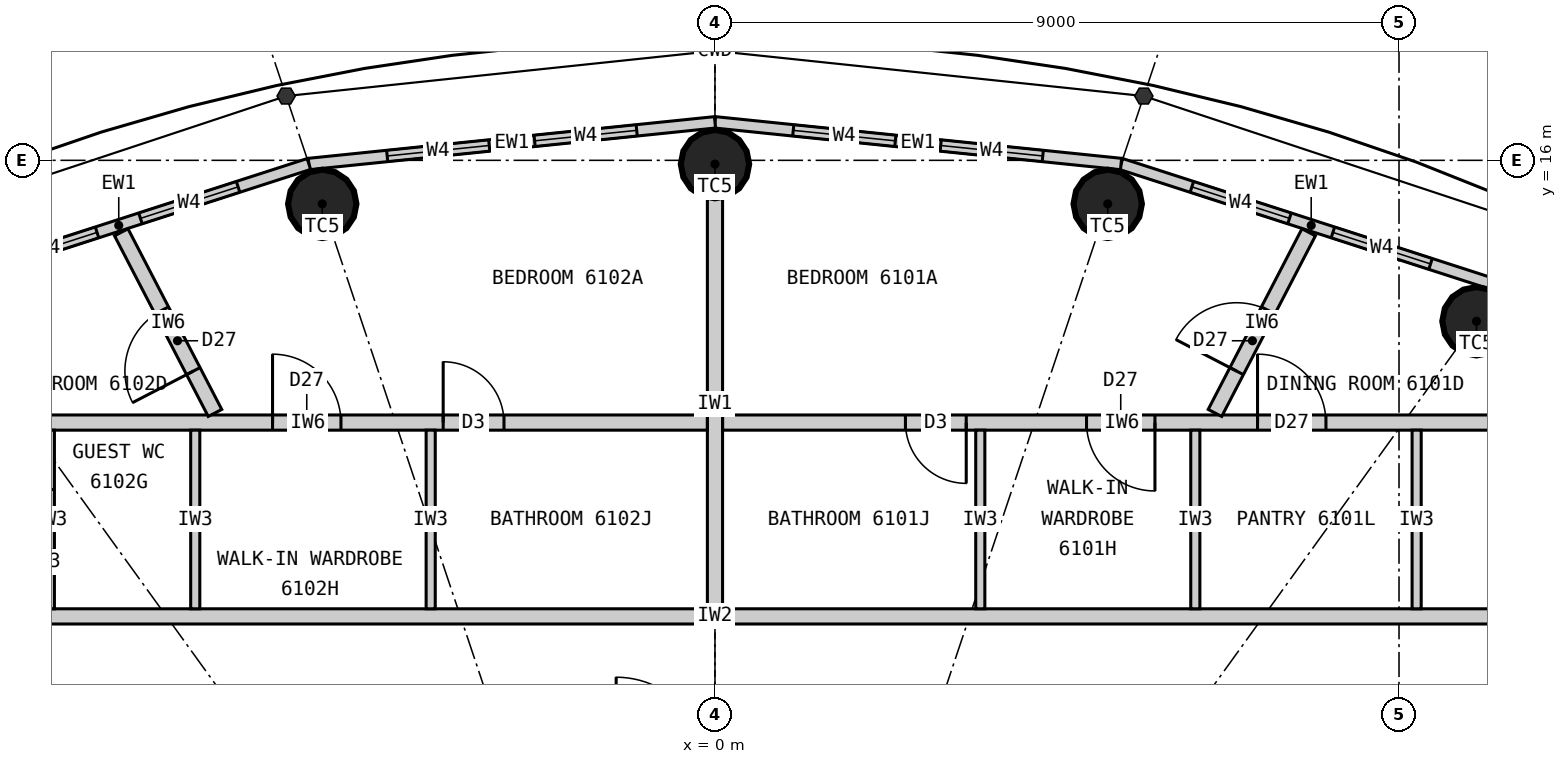
"""IFC4 building model, lengths in metres.
Left out: names, types, materials, properties, quantities, classifications, styles, units other than length and angle.
Written with IfcOpenShell. Run it as: python <this file> out.ifc"""

import sys

from ifc_helpers import new_model, si_unit, direction, frame, frame_2d, origin, origin_2d, place, context, subcontext, project, spatial, rectangle, circle, extrude, element, fill, save


model = new_model("IFC4")
c1 = context("Model", 3, precision=1e-05, world=origin(), true_north=direction((0.0, 1.0)))
c2 = subcontext(c1, "Body", "Model", "MODEL_VIEW")
j1 = project(units=[si_unit("LENGTHUNIT", "METRE"), si_unit("PLANEANGLEUNIT", "RADIAN")], contexts=[c1])
p1 = place(None, origin())
s1 = spatial("IfcSite", under=j1, at=p1, CompositionType="ELEMENT")
p2 = place(p1, origin())
s2 = spatial("IfcBuilding", under=s1, at=p2, CompositionType="ELEMENT")
p3 = place(p2, frame((0.0, 0.0, 225.9)))
s3 = spatial("IfcBuildingStorey", under=s2, at=p3, CompositionType="ELEMENT", Elevation=225.9)
for number, where, z_axis, x_axis in (
    (1, (10.019, 13.883, 0.0), (0.0, 0.0, 1.0), (1.0, 0.0, 0.0)),
    (2, (5.167, 15.427, 0.0), (0.0, 0.0, 1.0), (1.0, 0.0, 0.0)),
    (3, (0.0, 15.95, 0.0), (0.0, 0.0, 1.0), (1.0, 0.0, 0.0)),
    (4, (-5.167, 15.427, 0.0), (0.0, 0.0, 1.0), (1.0, 0.0, 0.0)),
):
    element("IfcColumn", number, at=place(p3, frame(where, z_axis=z_axis, x_axis=x_axis)), inside=s3, PredefinedType="COLUMN", context=c2, shape_type="SweptSolid", body=[
        extrude(circle(Radius=0.45, at=origin_2d()), origin(), (0.0, 0.0, 1.0), 3.3),
    ])
p4 = place(p3, frame((10.346, 14.336, 0.0), z_axis=(0.0, 0.0, 1.0), x_axis=(-0.951644702515, 0.307200846638, 0.0)))
e5 = element("IfcWall", 5, at=p4, inside=s3, PredefinedType="ELEMENTEDWALL", context=c2, shape_type="SweptSolid", body=[
    extrude(rectangle(XDim=5.258, YDim=0.15, at=frame_2d((2.629, 0.0))), origin(), (0.0, 0.0, 1.0), 3.12),
])
p5 = place(p4, frame((0.979, 0.0, 0.9)))
e6 = element("IfcOpeningElement", 6, at=p5, cuts=e5, PredefinedType="OPENING", context=c2, shape_type="SweptSolid", body=[
    extrude(rectangle(XDim=1.35, YDim=1.9, at=frame_2d((0.675, 0.95))), frame((0.0, 0.085, 0.0), z_axis=(0.0, -1.0, 0.0), x_axis=(1.0, 0.0, 0.0)), (0.0, 0.0, 1.0), 0.17),
])
p6 = place(p4, frame((2.929, 0.0, 0.9)))
e7 = element("IfcOpeningElement", 7, at=p6, cuts=e5, PredefinedType="OPENING", context=c2, shape_type="SweptSolid", body=[
    extrude(rectangle(XDim=1.35, YDim=1.9, at=frame_2d((0.675, 0.95))), frame((0.0, 0.085, 0.0), z_axis=(0.0, -1.0, 0.0), x_axis=(1.0, 0.0, 0.0)), (0.0, 0.0, 1.0), 0.17),
])
p7 = place(p3, frame((5.343, 15.952, 0.0), z_axis=(0.0, 0.0, 1.0), x_axis=(-0.994774574972, 0.102095763818, 0.0)))
e8 = element("IfcWall", 8, at=p7, inside=s3, PredefinedType="ELEMENTEDWALL", context=c2, shape_type="SweptSolid", body=[
    extrude(rectangle(XDim=5.371, YDim=0.15, at=frame_2d((2.686, 0.0))), origin(), (0.0, 0.0, 1.0), 3.12),
])
p8 = place(p7, frame((1.035, 0.0, 0.9)))
e9 = element("IfcOpeningElement", 9, at=p8, cuts=e8, PredefinedType="OPENING", context=c2, shape_type="SweptSolid", body=[
    extrude(rectangle(XDim=1.35, YDim=1.9, at=frame_2d((0.675, 0.95))), frame((0.0, 0.085, 0.0), z_axis=(0.0, -1.0, 0.0), x_axis=(1.0, 0.0, 0.0)), (0.0, 0.0, 1.0), 0.17),
])
p9 = place(p7, frame((2.985, 0.0, 0.9)))
e10 = element("IfcOpeningElement", 10, at=p9, cuts=e8, PredefinedType="OPENING", context=c2, shape_type="SweptSolid", body=[
    extrude(rectangle(XDim=1.35, YDim=1.9, at=frame_2d((0.675, 0.95))), frame((0.0, 0.085, 0.0), z_axis=(0.0, -1.0, 0.0), x_axis=(1.0, 0.0, 0.0)), (0.0, 0.0, 1.0), 0.17),
])
p10 = place(p3, frame((0.0, 16.5, 0.0), z_axis=(0.0, 0.0, 1.0), x_axis=(-0.994774574972, -0.102095763818, 0.0)))
e11 = element("IfcWall", 11, at=p10, inside=s3, PredefinedType="ELEMENTEDWALL", context=c2, shape_type="SweptSolid", body=[
    extrude(rectangle(XDim=5.371, YDim=0.15, at=frame_2d((2.686, 0.0))), origin(), (0.0, 0.0, 1.0), 3.12),
])
p11 = place(p10, frame((1.035, 0.0, 0.9)))
e12 = element("IfcOpeningElement", 12, at=p11, cuts=e11, PredefinedType="OPENING", context=c2, shape_type="SweptSolid", body=[
    extrude(rectangle(XDim=1.35, YDim=1.9, at=frame_2d((0.675, 0.95))), frame((0.0, 0.085, 0.0), z_axis=(0.0, -1.0, 0.0), x_axis=(1.0, 0.0, 0.0)), (0.0, 0.0, 1.0), 0.17),
])
p12 = place(p10, frame((2.985, 0.0, 0.9)))
e13 = element("IfcOpeningElement", 13, at=p12, cuts=e11, PredefinedType="OPENING", context=c2, shape_type="SweptSolid", body=[
    extrude(rectangle(XDim=1.35, YDim=1.9, at=frame_2d((0.675, 0.95))), frame((0.0, 0.085, 0.0), z_axis=(0.0, -1.0, 0.0), x_axis=(1.0, 0.0, 0.0)), (0.0, 0.0, 1.0), 0.17),
])
p13 = place(p3, frame((-5.343, 15.952, 0.0), z_axis=(0.0, 0.0, 1.0), x_axis=(-0.951644702515, -0.307200846638, 0.0)))
e14 = element("IfcWall", 14, at=p13, inside=s3, PredefinedType="ELEMENTEDWALL", context=c2, shape_type="SweptSolid", body=[
    extrude(rectangle(XDim=5.258, YDim=0.15, at=frame_2d((2.629, 0.0))), origin(), (0.0, 0.0, 1.0), 3.12),
])
p14 = place(p13, frame((0.979, 0.0, 0.9)))
e15 = element("IfcOpeningElement", 15, at=p14, cuts=e14, PredefinedType="OPENING", context=c2, shape_type="SweptSolid", body=[
    extrude(rectangle(XDim=1.35, YDim=1.9, at=frame_2d((0.675, 0.95))), frame((0.0, 0.085, 0.0), z_axis=(0.0, -1.0, 0.0), x_axis=(1.0, 0.0, 0.0)), (0.0, 0.0, 1.0), 0.17),
])
p15 = place(p13, frame((2.929, 0.0, 0.9)))
e16 = element("IfcOpeningElement", 16, at=p15, cuts=e14, PredefinedType="OPENING", context=c2, shape_type="SweptSolid", body=[
    extrude(rectangle(XDim=1.35, YDim=1.9, at=frame_2d((0.675, 0.95))), frame((0.0, 0.085, 0.0), z_axis=(0.0, -1.0, 0.0), x_axis=(1.0, 0.0, 0.0)), (0.0, 0.0, 1.0), 0.17),
])
p16 = place(p3, frame((-11.1, 10.0, 0.0), z_axis=(0.0, 0.0, 1.0), x_axis=(1.0, 0.0, 0.0)))
e17 = element("IfcWall", 17, at=p16, inside=s3, PredefinedType="PARTITIONING", context=c2, shape_type="SweptSolid", body=[
    extrude(rectangle(XDim=22.2, YDim=0.2, at=frame_2d((11.1, 0.0))), origin(), (0.0, 0.0, 1.0), 3.12),
])
p17 = place(p16, frame((0.3, 0.0, 0.0)))
e18 = element("IfcOpeningElement", 18, at=p17, cuts=e17, PredefinedType="OPENING", context=c2, shape_type="SweptSolid", body=[
    extrude(rectangle(XDim=1.0, YDim=2.2, at=frame_2d((0.5, 1.1))), frame((0.0, 0.11, 0.0), z_axis=(0.0, -1.0, 0.0), x_axis=(1.0, 0.0, 0.0)), (0.0, 0.0, 1.0), 0.22),
])
p18 = place(p3, frame((0.0, 10.1, 0.0), z_axis=(0.0, 0.0, 1.0), x_axis=(0.0, 1.0, 0.0)))
e19 = element("IfcWall", 19, at=p18, inside=s3, PredefinedType="PARTITIONING", context=c2, shape_type="SweptSolid", body=[
    extrude(rectangle(XDim=5.4, YDim=0.2, at=frame_2d((2.7, 0.0))), origin(), (0.0, 0.0, 1.0), 2.42),
])
p19 = place(p3, frame((10.609, 12.55, 0.0), z_axis=(0.0, 0.0, 1.0), x_axis=(-1.0, 0.0, 0.0)))
e20 = element("IfcWall", 20, at=p19, inside=s3, PredefinedType="PARTITIONING", context=c2, shape_type="SweptSolid", body=[
    extrude(rectangle(XDim=10.508, YDim=0.2, at=frame_2d((5.254, 0.0))), origin(), (0.0, 0.0, 1.0), 3.12),
])
p20 = place(p19, frame((2.57, 0.0, 0.0)))
e21 = element("IfcOpeningElement", 21, at=p20, cuts=e20, PredefinedType="OPENING", context=c2, shape_type="SweptSolid", body=[
    extrude(rectangle(XDim=0.9, YDim=2.1, at=frame_2d((0.45, 1.05))), frame((0.0, 0.11, 0.0), z_axis=(0.0, -1.0, 0.0), x_axis=(1.0, 0.0, 0.0)), (0.0, 0.0, 1.0), 0.22),
])
p21 = place(p19, frame((4.82, 0.0, 0.0)))
e22 = element("IfcOpeningElement", 22, at=p21, cuts=e20, PredefinedType="OPENING", context=c2, shape_type="SweptSolid", body=[
    extrude(rectangle(XDim=0.9, YDim=2.1, at=frame_2d((0.45, 1.05))), frame((0.0, 0.11, 0.0), z_axis=(0.0, -1.0, 0.0), x_axis=(1.0, 0.0, 0.0)), (0.0, 0.0, 1.0), 0.22),
])
p22 = place(p19, frame((7.303, 0.0, 0.0)))
e23 = element("IfcOpeningElement", 23, at=p22, cuts=e20, PredefinedType="OPENING", context=c2, shape_type="SweptSolid", body=[
    extrude(rectangle(XDim=0.8, YDim=2.1, at=frame_2d((0.4, 1.05))), frame((0.0, 0.11, 0.0), z_axis=(0.0, -1.0, 0.0), x_axis=(1.0, 0.0, 0.0)), (0.0, 0.0, 1.0), 0.22),
])
p23 = place(p3, frame((6.578, 12.677, 0.0), z_axis=(0.0, 0.0, 1.0), x_axis=(0.460620531465, 0.887597164255, 0.0)))
e24 = element("IfcWall", 24, at=p23, inside=s3, PredefinedType="PARTITIONING", context=c2, shape_type="SweptSolid", body=[
    extrude(rectangle(XDim=2.678, YDim=0.2, at=frame_2d((1.339, 0.0))), origin(), (0.0, 0.0, 1.0), 3.12),
])
p24 = place(p23, frame((0.62, 0.0, 0.0)))
e25 = element("IfcOpeningElement", 25, at=p24, cuts=e24, PredefinedType="OPENING", context=c2, shape_type="SweptSolid", body=[
    extrude(rectangle(XDim=0.9, YDim=2.1, at=frame_2d((0.45, 1.05))), frame((0.0, 0.11, 0.0), z_axis=(0.0, -1.0, 0.0), x_axis=(1.0, 0.0, 0.0)), (0.0, 0.0, 1.0), 0.22),
])
for number, where, z_axis, x_axis in (
    (26, (9.232, 10.1, 0.0), (0.0, 0.0, 1.0), (0.0, 1.0, 0.0)),
    (27, (6.32, 10.1, 0.0), (0.0, 0.0, 1.0), (0.0, 1.0, 0.0)),
    (28, (3.491, 10.1, 0.0), (0.0, 0.0, 1.0), (0.0, 1.0, 0.0)),
):
    element("IfcWall", number, at=place(p3, frame(where, z_axis=z_axis, x_axis=x_axis)), inside=s3, PredefinedType="PARTITIONING", context=c2, shape_type="SweptSolid", body=[
        extrude(rectangle(XDim=2.35, YDim=0.12, at=frame_2d((1.175, 0.0))), origin(), (0.0, 0.0, 1.0), 3.12),
    ])
p25 = place(p3, frame((-0.101, 12.55, 0.0), z_axis=(0.0, 0.0, 1.0), x_axis=(-1.0, 0.0, 0.0)))
e29 = element("IfcWall", 29, at=p25, inside=s3, PredefinedType="PARTITIONING", context=c2, shape_type="SweptSolid", body=[
    extrude(rectangle(XDim=10.508, YDim=0.2, at=frame_2d((5.254, 0.0))), origin(), (0.0, 0.0, 1.0), 3.12),
])
p26 = place(p25, frame((2.675, 0.0, 0.0)))
e30 = element("IfcOpeningElement", 30, at=p26, cuts=e29, PredefinedType="OPENING", context=c2, shape_type="SweptSolid", body=[
    extrude(rectangle(XDim=0.8, YDim=2.1, at=frame_2d((0.4, 1.05))), frame((0.0, 0.11, 0.0), z_axis=(0.0, -1.0, 0.0), x_axis=(1.0, 0.0, 0.0)), (0.0, 0.0, 1.0), 0.22),
])
p27 = place(p25, frame((4.82, 0.0, 0.0)))
e31 = element("IfcOpeningElement", 31, at=p27, cuts=e29, PredefinedType="OPENING", context=c2, shape_type="SweptSolid", body=[
    extrude(rectangle(XDim=0.9, YDim=2.1, at=frame_2d((0.45, 1.05))), frame((0.0, 0.11, 0.0), z_axis=(0.0, -1.0, 0.0), x_axis=(1.0, 0.0, 0.0)), (0.0, 0.0, 1.0), 0.22),
])
p28 = place(p3, frame((-6.578, 12.677, 0.0), z_axis=(0.0, 0.0, 1.0), x_axis=(-0.460620531465, 0.887597164255, 0.0)))
e32 = element("IfcWall", 32, at=p28, inside=s3, PredefinedType="PARTITIONING", context=c2, shape_type="SweptSolid", body=[
    extrude(rectangle(XDim=2.678, YDim=0.2, at=frame_2d((1.339, 0.0))), origin(), (0.0, 0.0, 1.0), 3.12),
])
p29 = place(p28, frame((0.62, 0.0, 0.0)))
e33 = element("IfcOpeningElement", 33, at=p29, cuts=e32, PredefinedType="OPENING", context=c2, shape_type="SweptSolid", body=[
    extrude(rectangle(XDim=0.9, YDim=2.1, at=frame_2d((0.45, 1.05))), frame((0.0, 0.11, 0.0), z_axis=(0.0, -1.0, 0.0), x_axis=(1.0, 0.0, 0.0)), (0.0, 0.0, 1.0), 0.22),
])
for number, where, z_axis, x_axis in (
    (34, (-3.74, 10.1, 0.0), (0.0, 0.0, 1.0), (0.0, 1.0, 0.0)),
    (35, (-6.838, 10.1, 0.0), (0.0, 0.0, 1.0), (0.0, 1.0, 0.0)),
):
    element("IfcWall", number, at=place(p3, frame(where, z_axis=z_axis, x_axis=x_axis)), inside=s3, PredefinedType="PARTITIONING", context=c2, shape_type="SweptSolid", body=[
        extrude(rectangle(XDim=2.35, YDim=0.12, at=frame_2d((1.175, 0.0))), origin(), (0.0, 0.0, 1.0), 3.12),
    ])
p30 = place(p3, frame((-8.751, 10.1, 0.0), z_axis=(0.0, 0.0, 1.0), x_axis=(0.0, 1.0, 0.0)))
e36 = element("IfcWall", 36, at=p30, inside=s3, PredefinedType="PARTITIONING", context=c2, shape_type="SweptSolid", body=[
    extrude(rectangle(XDim=2.35, YDim=0.12, at=frame_2d((1.175, 0.0))), origin(), (0.0, 0.0, 1.0), 3.12),
])
p31 = place(p30, frame((0.77, 0.0, 0.0)))
e37 = element("IfcOpeningElement", 37, at=p31, cuts=e36, PredefinedType="OPENING", context=c2, shape_type="SweptSolid", body=[
    extrude(rectangle(XDim=0.8, YDim=2.1, at=frame_2d((0.4, 1.05))), frame((0.0, 0.07, 0.0), z_axis=(0.0, -1.0, 0.0), x_axis=(1.0, 0.0, 0.0)), (0.0, 0.0, 1.0), 0.14),
])
p32 = place(p5, origin())
e38 = element("IfcWindow", 38, at=p32, inside=s3, PartitioningType="SINGLE_PANEL", PredefinedType="WINDOW", context=c2, shape_type="SweptSolid", body=[
    extrude(rectangle(XDim=1.35, YDim=1.9, at=frame_2d((0.675, 0.95))), frame((0.0, 0.03, 0.0), z_axis=(0.0, -1.0, 0.0), x_axis=(1.0, 0.0, 0.0)), (0.0, 0.0, 1.0), 0.06),
])
fill(e6, e38)
p33 = place(p6, origin())
e39 = element("IfcWindow", 39, at=p33, inside=s3, PartitioningType="SINGLE_PANEL", PredefinedType="WINDOW", context=c2, shape_type="SweptSolid", body=[
    extrude(rectangle(XDim=1.35, YDim=1.9, at=frame_2d((0.675, 0.95))), frame((0.0, 0.03, 0.0), z_axis=(0.0, -1.0, 0.0), x_axis=(1.0, 0.0, 0.0)), (0.0, 0.0, 1.0), 0.06),
])
fill(e7, e39)
p34 = place(p8, origin())
e40 = element("IfcWindow", 40, at=p34, inside=s3, PartitioningType="SINGLE_PANEL", PredefinedType="WINDOW", context=c2, shape_type="SweptSolid", body=[
    extrude(rectangle(XDim=1.35, YDim=1.9, at=frame_2d((0.675, 0.95))), frame((0.0, 0.03, 0.0), z_axis=(0.0, -1.0, 0.0), x_axis=(1.0, 0.0, 0.0)), (0.0, 0.0, 1.0), 0.06),
])
fill(e9, e40)
p35 = place(p9, origin())
e41 = element("IfcWindow", 41, at=p35, inside=s3, PartitioningType="SINGLE_PANEL", PredefinedType="WINDOW", context=c2, shape_type="SweptSolid", body=[
    extrude(rectangle(XDim=1.35, YDim=1.9, at=frame_2d((0.675, 0.95))), frame((0.0, 0.03, 0.0), z_axis=(0.0, -1.0, 0.0), x_axis=(1.0, 0.0, 0.0)), (0.0, 0.0, 1.0), 0.06),
])
fill(e10, e41)
p36 = place(p11, origin())
e42 = element("IfcWindow", 42, at=p36, inside=s3, PartitioningType="SINGLE_PANEL", PredefinedType="WINDOW", context=c2, shape_type="SweptSolid", body=[
    extrude(rectangle(XDim=1.35, YDim=1.9, at=frame_2d((0.675, 0.95))), frame((0.0, 0.03, 0.0), z_axis=(0.0, -1.0, 0.0), x_axis=(1.0, 0.0, 0.0)), (0.0, 0.0, 1.0), 0.06),
])
fill(e12, e42)
p37 = place(p12, origin())
e43 = element("IfcWindow", 43, at=p37, inside=s3, PartitioningType="SINGLE_PANEL", PredefinedType="WINDOW", context=c2, shape_type="SweptSolid", body=[
    extrude(rectangle(XDim=1.35, YDim=1.9, at=frame_2d((0.675, 0.95))), frame((0.0, 0.03, 0.0), z_axis=(0.0, -1.0, 0.0), x_axis=(1.0, 0.0, 0.0)), (0.0, 0.0, 1.0), 0.06),
])
fill(e13, e43)
p38 = place(p14, origin())
e44 = element("IfcWindow", 44, at=p38, inside=s3, PartitioningType="SINGLE_PANEL", PredefinedType="WINDOW", context=c2, shape_type="SweptSolid", body=[
    extrude(rectangle(XDim=1.35, YDim=1.9, at=frame_2d((0.675, 0.95))), frame((0.0, 0.03, 0.0), z_axis=(0.0, -1.0, 0.0), x_axis=(1.0, 0.0, 0.0)), (0.0, 0.0, 1.0), 0.06),
])
fill(e15, e44)
p39 = place(p15, origin())
e45 = element("IfcWindow", 45, at=p39, inside=s3, PartitioningType="SINGLE_PANEL", PredefinedType="WINDOW", context=c2, shape_type="SweptSolid", body=[
    extrude(rectangle(XDim=1.35, YDim=1.9, at=frame_2d((0.675, 0.95))), frame((0.0, 0.03, 0.0), z_axis=(0.0, -1.0, 0.0), x_axis=(1.0, 0.0, 0.0)), (0.0, 0.0, 1.0), 0.06),
])
fill(e16, e45)
p40 = place(p20, origin())
e46 = element("IfcDoor", 46, at=p40, inside=s3, OperationType="SINGLE_SWING_RIGHT", PredefinedType="DOOR", context=c2, shape_type="SweptSolid", body=[
    extrude(rectangle(XDim=0.9, YDim=2.1, at=frame_2d((0.45, 1.05))), frame((0.0, 0.025, 0.0), z_axis=(0.0, -1.0, 0.0), x_axis=(1.0, 0.0, 0.0)), (0.0, 0.0, 1.0), 0.05),
])
fill(e21, e46)
p41 = place(p21, origin())
e47 = element("IfcDoor", 47, at=p41, inside=s3, OperationType="SINGLE_SWING_LEFT", PredefinedType="DOOR", context=c2, shape_type="SweptSolid", body=[
    extrude(rectangle(XDim=0.9, YDim=2.1, at=frame_2d((0.45, 1.05))), frame((0.0, 0.025, 0.0), z_axis=(0.0, -1.0, 0.0), x_axis=(1.0, 0.0, 0.0)), (0.0, 0.0, 1.0), 0.05),
])
fill(e22, e47)
p42 = place(p22, origin())
e48 = element("IfcDoor", 48, at=p42, inside=s3, OperationType="SINGLE_SWING_LEFT", PredefinedType="DOOR", context=c2, shape_type="SweptSolid", body=[
    extrude(rectangle(XDim=0.8, YDim=2.1, at=frame_2d((0.4, 1.05))), frame((0.0, 0.025, 0.0), z_axis=(0.0, -1.0, 0.0), x_axis=(1.0, 0.0, 0.0)), (0.0, 0.0, 1.0), 0.05),
])
fill(e23, e48)
p43 = place(p24, origin())
e49 = element("IfcDoor", 49, at=p43, inside=s3, OperationType="SINGLE_SWING_LEFT", PredefinedType="DOOR", context=c2, shape_type="SweptSolid", body=[
    extrude(rectangle(XDim=0.9, YDim=2.1, at=frame_2d((0.45, 1.05))), frame((0.0, 0.025, 0.0), z_axis=(0.0, -1.0, 0.0), x_axis=(1.0, 0.0, 0.0)), (0.0, 0.0, 1.0), 0.05),
])
fill(e25, e49)
p44 = place(p26, origin())
e50 = element("IfcDoor", 50, at=p44, inside=s3, OperationType="SINGLE_SWING_RIGHT", PredefinedType="DOOR", context=c2, shape_type="SweptSolid", body=[
    extrude(rectangle(XDim=0.8, YDim=2.1, at=frame_2d((0.4, 1.05))), frame((0.0, 0.025, 0.0), z_axis=(0.0, -1.0, 0.0), x_axis=(1.0, 0.0, 0.0)), (0.0, 0.0, 1.0), 0.05),
])
fill(e30, e50)
p45 = place(p27, origin())
e51 = element("IfcDoor", 51, at=p45, inside=s3, OperationType="SINGLE_SWING_RIGHT", PredefinedType="DOOR", context=c2, shape_type="SweptSolid", body=[
    extrude(rectangle(XDim=0.9, YDim=2.1, at=frame_2d((0.45, 1.05))), frame((0.0, 0.025, 0.0), z_axis=(0.0, -1.0, 0.0), x_axis=(1.0, 0.0, 0.0)), (0.0, 0.0, 1.0), 0.05),
])
fill(e31, e51)
p46 = place(p29, origin())
e52 = element("IfcDoor", 52, at=p46, inside=s3, OperationType="SINGLE_SWING_LEFT", PredefinedType="DOOR", context=c2, shape_type="SweptSolid", body=[
    extrude(rectangle(XDim=0.9, YDim=2.1, at=frame_2d((0.45, 1.05))), frame((0.0, 0.025, 0.0), z_axis=(0.0, -1.0, 0.0), x_axis=(1.0, 0.0, 0.0)), (0.0, 0.0, 1.0), 0.05),
])
fill(e33, e52)
save(model, sys.argv[1])
